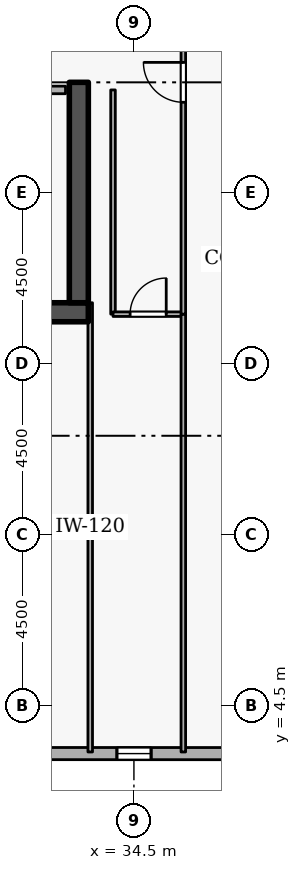
"""IFC4 building model, lengths in metres.
Left out: names, types, materials, properties, quantities, classifications, styles, units other than length and angle.
Written with IfcOpenShell. Run it as: python <this file> out.ifc"""

import sys

from ifc_helpers import new_model, si_unit, direction, frame, frame_2d, origin, place, context, subcontext, project, spatial, rectangle, extrude, element, fill, save


model = new_model("IFC4")
c1 = context("Model", 3, precision=1e-05, world=origin(), true_north=direction((0.0, 1.0)))
c2 = subcontext(c1, "Body", "Model", "MODEL_VIEW")
j1 = project(units=[si_unit("LENGTHUNIT", "METRE"), si_unit("PLANEANGLEUNIT", "RADIAN")], contexts=[c1])
p1 = place(None, origin())
s1 = spatial("IfcSite", under=j1, at=p1, CompositionType="ELEMENT")
p2 = place(p1, origin())
s2 = spatial("IfcBuilding", under=s1, at=p2, CompositionType="ELEMENT")
p3 = place(p2, frame((0.0, 0.0, 236.7)))
s3 = spatial("IfcBuildingStorey", under=s2, at=p3, CompositionType="ELEMENT", Elevation=236.7)
p4 = place(p3, frame((17.7, 14.85, 0.0), z_axis=(0.0, 0.0, 1.0), x_axis=(1.0, 0.0, 0.0)))
e1 = element("IfcWall", 1, at=p4, inside=s3, PredefinedType="SHEAR", context=c2, shape_type="SweptSolid", body=[
    extrude(rectangle(XDim=15.6, YDim=0.5, at=frame_2d((7.8, 0.0))), origin(), (0.0, 0.0, 1.0), 3.6),
])
p5 = place(p3, frame((33.05, 15.1, 0.0), z_axis=(0.0, 0.0, 1.0), x_axis=(0.0, 1.0, 0.0)))
e2 = element("IfcWall", 2, at=p5, inside=s3, PredefinedType="SHEAR", context=c2, shape_type="SweptSolid", body=[
    extrude(rectangle(XDim=5.8, YDim=0.5, at=frame_2d((2.9, 0.0))), origin(), (0.0, 0.0, 1.0), 3.6),
])
p6 = place(p3, frame((7.352, 3.245, 0.0), z_axis=(0.0, 0.0, 1.0), x_axis=(0.999999954901, -0.000300328883, 0.0)))
e3 = element("IfcWall", 3, at=p6, inside=s3, PredefinedType="STANDARD", context=c2, shape_type="SweptSolid", body=[
    extrude(rectangle(XDim=33.329, YDim=0.32, at=frame_2d((16.665, 0.0))), origin(), (0.0, 0.0, 1.0), 2.7),
])
p7 = place(p6, frame((2.7, 0.0, 0.72)))
e4 = element("IfcOpeningElement", 4, at=p7, cuts=e3, PredefinedType="OPENING", context=c2, shape_type="SweptSolid", body=[
    extrude(rectangle(XDim=0.9, YDim=1.75, at=frame_2d((0.45, 0.875))), frame((0.0, 0.17, 0.0), z_axis=(0.0, -1.0, 0.0), x_axis=(1.0, 0.0, 0.0)), (0.0, 0.0, 1.0), 0.34),
])
p8 = place(p6, frame((12.3, 0.0, 0.72)))
e5 = element("IfcOpeningElement", 5, at=p8, cuts=e3, PredefinedType="OPENING", context=c2, shape_type="SweptSolid", body=[
    extrude(rectangle(XDim=0.9, YDim=1.75, at=frame_2d((0.45, 0.875))), frame((0.0, 0.17, 0.0), z_axis=(0.0, -1.0, 0.0), x_axis=(1.0, 0.0, 0.0)), (0.0, 0.0, 1.0), 0.34),
])
p9 = place(p6, frame((17.1, 0.0, 0.72)))
e6 = element("IfcOpeningElement", 6, at=p9, cuts=e3, PredefinedType="OPENING", context=c2, shape_type="SweptSolid", body=[
    extrude(rectangle(XDim=0.9, YDim=1.75, at=frame_2d((0.45, 0.875))), frame((0.0, 0.17, 0.0), z_axis=(0.0, -1.0, 0.0), x_axis=(1.0, 0.0, 0.0)), (0.0, 0.0, 1.0), 0.34),
])
p10 = place(p6, frame((21.9, 0.0, 0.72)))
e7 = element("IfcOpeningElement", 7, at=p10, cuts=e3, PredefinedType="OPENING", context=c2, shape_type="SweptSolid", body=[
    extrude(rectangle(XDim=0.9, YDim=1.75, at=frame_2d((0.45, 0.875))), frame((0.0, 0.17, 0.0), z_axis=(0.0, -1.0, 0.0), x_axis=(1.0, 0.0, 0.0)), (0.0, 0.0, 1.0), 0.34),
])
p11 = place(p6, frame((26.7, 0.0, 0.72)))
e8 = element("IfcOpeningElement", 8, at=p11, cuts=e3, PredefinedType="OPENING", context=c2, shape_type="SweptSolid", body=[
    extrude(rectangle(XDim=0.9, YDim=1.75, at=frame_2d((0.45, 0.875))), frame((0.0, 0.17, 0.0), z_axis=(0.0, -1.0, 0.0), x_axis=(1.0, 0.0, 0.0)), (0.0, 0.0, 1.0), 0.34),
])
p12 = place(p3, frame((30.45, 20.7, 0.0), z_axis=(0.0, 0.0, 1.0), x_axis=(1.0, 0.0, 0.0)))
e9 = element("IfcWall", 9, at=p12, inside=s3, PredefinedType="STANDARD", context=c2, shape_type="SweptSolid", body=[
    extrude(rectangle(XDim=2.25, YDim=0.2, at=frame_2d((1.125, 0.0))), origin(), (0.0, 0.0, 1.0), 3.34),
])
p13 = place(p12, frame((0.55, 0.0, 0.0)))
e10 = element("IfcOpeningElement", 10, at=p13, cuts=e9, PredefinedType="OPENING", context=c2, shape_type="SweptSolid", body=[
    extrude(rectangle(XDim=1.15, YDim=2.1, at=frame_2d((0.575, 1.05))), frame((0.0, 0.11, 0.0), z_axis=(0.0, -1.0, 0.0), x_axis=(1.0, 0.0, 0.0)), (0.0, 0.0, 1.0), 0.22),
])
p14 = place(p3, frame((33.95, 20.7, 0.0), z_axis=(0.0, 0.0, 1.0), x_axis=(0.0, -1.0, 0.0)))
e11 = element("IfcWall", 11, at=p14, inside=s3, PredefinedType="PARTITIONING", context=c2, shape_type="SweptSolid", body=[
    extrude(rectangle(XDim=5.9, YDim=0.12, at=frame_2d((2.95, 0.0))), origin(), (0.0, 0.0, 1.0), 3.34),
])
p15 = place(p3, frame((33.95, 14.8, 0.0), z_axis=(0.0, 0.0, 1.0), x_axis=(1.0, 0.0, 0.0)))
e12 = element("IfcWall", 12, at=p15, inside=s3, PredefinedType="PARTITIONING", context=c2, shape_type="SweptSolid", body=[
    extrude(rectangle(XDim=1.85, YDim=0.12, at=frame_2d((0.925, 0.0))), origin(), (0.0, 0.0, 1.0), 3.34),
])
p16 = place(p15, frame((0.45, 0.0, 0.0)))
e13 = element("IfcOpeningElement", 13, at=p16, cuts=e12, PredefinedType="OPENING", context=c2, shape_type="SweptSolid", body=[
    extrude(rectangle(XDim=0.95, YDim=2.1, at=frame_2d((0.475, 1.05))), frame((0.0, 0.07, 0.0), z_axis=(0.0, -1.0, 0.0), x_axis=(1.0, 0.0, 0.0)), (0.0, 0.0, 1.0), 0.14),
])
p17 = place(p3, frame((35.8, 14.8, 0.0), z_axis=(0.0, 0.0, 1.0), x_axis=(0.0, -1.0, 0.0)))
e14 = element("IfcWall", 14, at=p17, inside=s3, PredefinedType="PARTITIONING", context=c2, shape_type="SweptSolid", body=[
    extrude(rectangle(XDim=11.52, YDim=0.12, at=frame_2d((5.76, 0.0))), origin(), (0.0, 0.0, 1.0), 3.34),
])
p18 = place(p3, frame((33.35, 3.28, 0.0), z_axis=(0.0, 0.0, 1.0), x_axis=(0.0, 1.0, 0.0)))
e15 = element("IfcWall", 15, at=p18, inside=s3, PredefinedType="PARTITIONING", context=c2, shape_type="SweptSolid", body=[
    extrude(rectangle(XDim=11.82, YDim=0.12, at=frame_2d((5.91, 0.0))), origin(), (0.0, 0.0, 1.0), 2.545),
])
p19 = place(p3, frame((35.8, 14.8, 0.0), z_axis=(0.0, 0.0, 1.0), x_axis=(0.0, 1.0, 0.0)))
e16 = element("IfcWall", 16, at=p19, inside=s3, PredefinedType="PARTITIONING", context=c2, shape_type="SweptSolid", body=[
    extrude(rectangle(XDim=12.2, YDim=0.12, at=frame_2d((6.1, 0.0))), origin(), (0.0, 0.0, 1.0), 3.34),
])
p20 = place(p19, frame((5.575, 0.0, 0.0)))
e17 = element("IfcOpeningElement", 17, at=p20, cuts=e16, PredefinedType="OPENING", context=c2, shape_type="SweptSolid", body=[
    extrude(rectangle(XDim=1.05, YDim=2.1, at=frame_2d((0.525, 1.05))), frame((0.0, 0.07, 0.0), z_axis=(0.0, -1.0, 0.0), x_axis=(1.0, 0.0, 0.0)), (0.0, 0.0, 1.0), 0.14),
])
p21 = place(p11, origin())
e18 = element("IfcWindow", 18, at=p21, inside=s3, PartitioningType="SINGLE_PANEL", PredefinedType="WINDOW", context=c2, shape_type="SweptSolid", body=[
    extrude(rectangle(XDim=0.9, YDim=1.75, at=frame_2d((0.45, 0.875))), frame((0.0, 0.03, 0.0), z_axis=(0.0, -1.0, 0.0), x_axis=(1.0, 0.0, 0.0)), (0.0, 0.0, 1.0), 0.06),
])
fill(e8, e18)
p22 = place(p16, origin())
e19 = element("IfcDoor", 19, at=p22, inside=s3, OperationType="SINGLE_SWING_RIGHT", PredefinedType="DOOR", context=c2, shape_type="SweptSolid", body=[
    extrude(rectangle(XDim=0.95, YDim=2.1, at=frame_2d((0.475, 1.05))), frame((0.0, 0.025, 0.0), z_axis=(0.0, -1.0, 0.0), x_axis=(1.0, 0.0, 0.0)), (0.0, 0.0, 1.0), 0.05),
])
fill(e13, e19)
p23 = place(p20, origin())
e20 = element("IfcDoor", 20, at=p23, inside=s3, OperationType="SINGLE_SWING_RIGHT", PredefinedType="DOOR", context=c2, shape_type="SweptSolid", body=[
    extrude(rectangle(XDim=1.05, YDim=2.1, at=frame_2d((0.525, 1.05))), frame((0.0, 0.025, 0.0), z_axis=(0.0, -1.0, 0.0), x_axis=(1.0, 0.0, 0.0)), (0.0, 0.0, 1.0), 0.05),
])
fill(e17, e20)
save(model, sys.argv[1])
